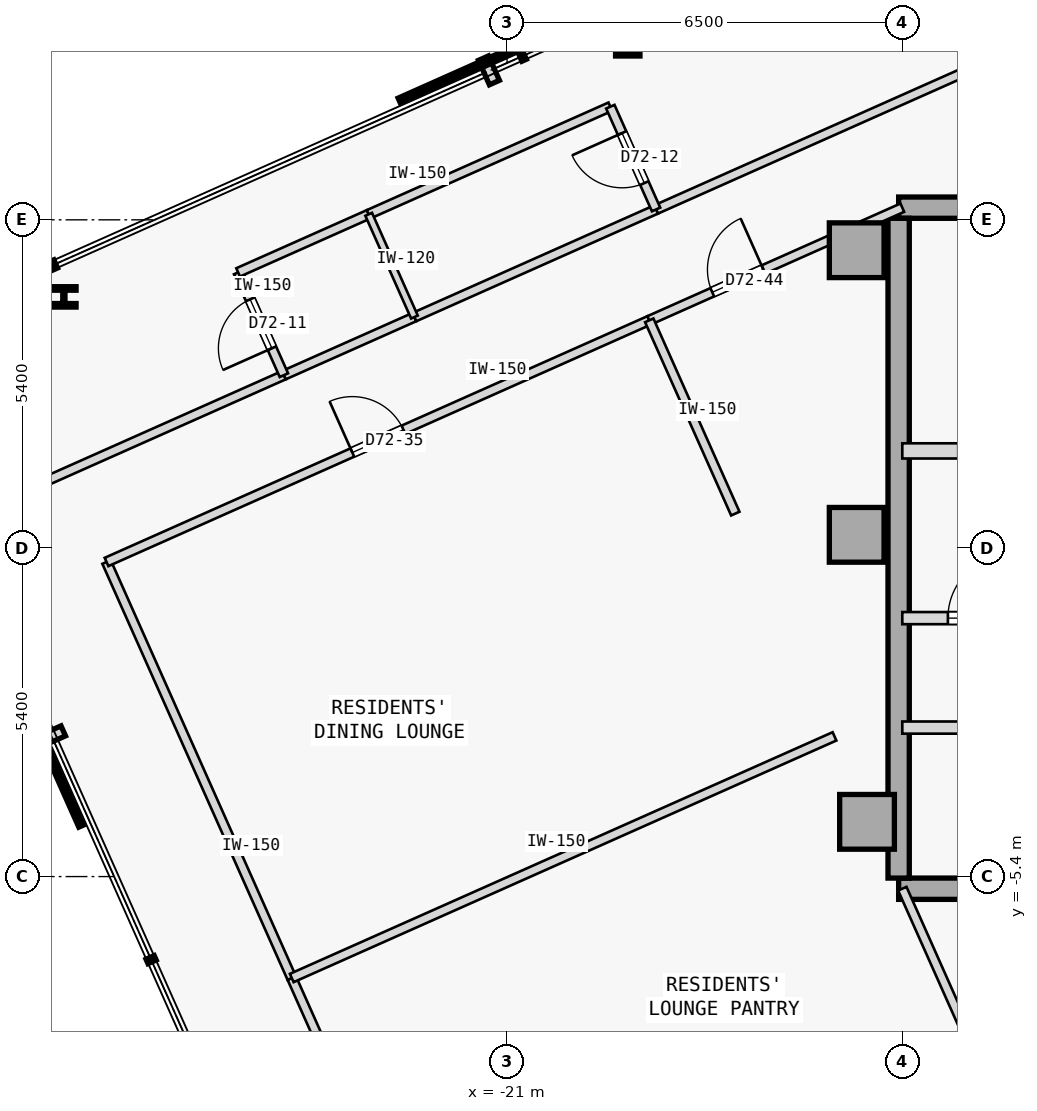
"""IFC4 building model, lengths in metres.
Left out: names, types, materials, properties, quantities, classifications, styles, units other than length and angle.
Written with IfcOpenShell. Run it as: python <this file> out.ifc"""

import sys

from ifc_helpers import new_model, si_unit, direction, frame, frame_2d, origin, origin_2d, place, context, subcontext, project, spatial, rectangle, i_section, extrude, element, fill, save


model = new_model("IFC4")
c1 = context("Model", 3, precision=1e-05, world=origin(), true_north=direction((0.0, 1.0)))
c2 = subcontext(c1, "Body", "Model", "MODEL_VIEW")
j1 = project(units=[si_unit("LENGTHUNIT", "METRE"), si_unit("PLANEANGLEUNIT", "RADIAN")], contexts=[c1])
p1 = place(None, origin())
s1 = spatial("IfcSite", under=j1, at=p1, CompositionType="ELEMENT")
p2 = place(p1, origin())
s2 = spatial("IfcBuilding", under=s1, at=p2, CompositionType="ELEMENT")
p3 = place(p2, frame((0.0, 0.0, 268.9)))
s3 = spatial("IfcBuildingStorey", under=s2, at=p3, CompositionType="ELEMENT", Elevation=268.9)
for number, where, z_axis, x_axis in (
    (1, (-15.25, 4.9, 0.0), (0.0, 0.0, 1.0), (1.0, 0.0, 0.0)),
    (2, (-15.25, 0.22, 0.0), (0.0, 0.0, 1.0), (1.0, 0.0, 0.0)),
    (3, (-15.08, -4.5, 0.0), (0.0, 0.0, 1.0), (1.0, 0.0, 0.0)),
):
    element("IfcColumn", number, at=place(p3, frame(where, z_axis=z_axis, x_axis=x_axis)), inside=s3, PredefinedType="COLUMN", context=c2, shape_type="SweptSolid", body=[
        extrude(rectangle(XDim=0.9, YDim=0.9, at=origin_2d()), origin(), (0.0, 0.0, 1.0), 3.35),
    ])
p4 = place(p3, frame((-14.56, 5.6, 0.0), z_axis=(0.0, 0.0, 1.0), x_axis=(1.0, 0.0, 0.0)))
e4 = element("IfcWall", 4, at=p4, inside=s3, PredefinedType="SHEAR", context=c2, shape_type="SweptSolid", body=[
    extrude(rectangle(XDim=11.41, YDim=0.35, at=frame_2d((5.705, 0.0))), origin(), (0.0, 0.0, 1.0), 3.125),
])
p5 = place(p3, frame((-14.56, -5.6, 0.0), z_axis=(0.0, 0.0, 1.0), x_axis=(1.0, 0.0, 0.0)))
e5 = element("IfcWall", 5, at=p5, inside=s3, PredefinedType="SHEAR", context=c2, shape_type="SweptSolid", body=[
    extrude(rectangle(XDim=10.86, YDim=0.35, at=frame_2d((5.43, 0.0))), origin(), (0.0, 0.0, 1.0), 3.125),
])
p6 = place(p3, frame((-14.56, -5.425, 0.0), z_axis=(0.0, 0.0, 1.0), x_axis=(0.0, 1.0, 0.0)))
e6 = element("IfcWall", 6, at=p6, inside=s3, PredefinedType="SHEAR", context=c2, shape_type="SweptSolid", body=[
    extrude(rectangle(XDim=10.85, YDim=0.35, at=frame_2d((5.425, 0.0))), origin(), (0.0, 0.0, 1.0), 3.125),
])
for number, where, z_axis, x_axis in (
    (7, (-19.015, 8.262, 0.0), (0.0, 0.0, 1.0), (1.0, 0.0, 0.0)),
    (8, (-28.288, 4.133, 0.0), (0.0, 0.0, 1.0), (1.0, 0.0, 0.0)),
):
    element("IfcColumn", number, at=place(p3, frame(where, z_axis=z_axis, x_axis=x_axis)), inside=s3, PredefinedType="COLUMN", context=c2, shape_type="SweptSolid", body=[
        extrude(i_section(OverallWidth=0.401, OverallDepth=0.335, WebThickness=0.036, FlangeThickness=0.058, FilletRadius=0.015, at=origin_2d()), origin(), (0.0, 0.0, 1.0), 3.35),
    ])
p7 = place(p3, frame((-14.5, 1.6, 0.0), z_axis=(0.0, 0.0, 1.0), x_axis=(1.0, 0.0, 0.0)))
e9 = element("IfcWall", 9, at=p7, inside=s3, PredefinedType="STANDARD", context=c2, shape_type="SweptSolid", body=[
    extrude(rectangle(XDim=3.6, YDim=0.25, at=frame_2d((1.8, 0.0))), origin(), (0.0, 0.0, 1.0), 3.125),
])
p8 = place(p7, frame((0.92, 0.0, 0.0)))
e10 = element("IfcOpeningElement", 10, at=p8, cuts=e9, PredefinedType="OPENING", context=c2, shape_type="SweptSolid", body=[
    extrude(rectangle(XDim=1.05, YDim=2.15, at=frame_2d((0.525, 1.075))), frame((0.0, 0.135, 0.0), z_axis=(0.0, -1.0, 0.0), x_axis=(1.0, 0.0, 0.0)), (0.0, 0.0, 1.0), 0.27),
])
p9 = place(p3, frame((-14.5, -1.15, 0.0), z_axis=(0.0, 0.0, 1.0), x_axis=(1.0, 0.0, 0.0)))
e11 = element("IfcWall", 11, at=p9, inside=s3, PredefinedType="STANDARD", context=c2, shape_type="SweptSolid", body=[
    extrude(rectangle(XDim=2.95, YDim=0.2, at=frame_2d((1.475, 0.0))), origin(), (0.0, 0.0, 1.0), 3.125),
])
p10 = place(p9, frame((0.75, 0.0, 0.0)))
e12 = element("IfcOpeningElement", 12, at=p10, cuts=e11, PredefinedType="OPENING", context=c2, shape_type="SweptSolid", body=[
    extrude(rectangle(XDim=1.05, YDim=2.18, at=frame_2d((0.525, 1.09))), frame((0.0, 0.11, 0.0), z_axis=(0.0, -1.0, 0.0), x_axis=(1.0, 0.0, 0.0)), (0.0, 0.0, 1.0), 0.22),
])
p11 = place(p3, frame((-14.5, -2.95, 0.0), z_axis=(0.0, 0.0, 1.0), x_axis=(1.0, 0.0, 0.0)))
e13 = element("IfcWall", 13, at=p11, inside=s3, PredefinedType="STANDARD", context=c2, shape_type="SweptSolid", body=[
    extrude(rectangle(XDim=10.8, YDim=0.2, at=frame_2d((5.4, 0.0))), origin(), (0.0, 0.0, 1.0), 3.125),
])
p12 = place(p11, frame((9.17, 0.0, 0.0)))
e14 = element("IfcOpeningElement", 14, at=p12, cuts=e13, PredefinedType="OPENING", context=c2, shape_type="SweptSolid", body=[
    extrude(rectangle(XDim=1.1, YDim=2.15, at=frame_2d((0.55, 1.075))), frame((0.0, 0.11, 0.0), z_axis=(0.0, -1.0, 0.0), x_axis=(1.0, 0.0, 0.0)), (0.0, 0.0, 1.0), 0.22),
])
p13 = place(p11, frame((3.86, 0.0, 0.0)))
e15 = element("IfcOpeningElement", 15, at=p13, cuts=e13, PredefinedType="OPENING", context=c2, shape_type="SweptSolid", body=[
    extrude(rectangle(XDim=0.92, YDim=2.15, at=frame_2d((0.46, 1.075))), frame((0.0, 0.11, 0.0), z_axis=(0.0, -1.0, 0.0), x_axis=(1.0, 0.0, 0.0)), (0.0, 0.0, 1.0), 0.22),
])
p14 = place(p3, frame((-30.063, 0.444, 0.0), z_axis=(0.0, 0.0, 1.0), x_axis=(0.913545336501, 0.406736915165, 0.0)))
e16 = element("IfcWall", 16, at=p14, inside=s3, PredefinedType="PARTITIONING", context=c2, shape_type="SweptSolid", body=[
    extrude(rectangle(XDim=5.904, YDim=0.15, at=frame_2d((2.952, 0.0))), origin(), (0.0, 0.0, 1.0), 3.125),
])
p15 = place(p3, frame((-18.549, 5.57, 0.0), z_axis=(0.0, 0.0, 1.0), x_axis=(0.913545955058, 0.40673552586, 0.0)))
e17 = element("IfcWall", 17, at=p15, inside=s3, PredefinedType="PARTITIONING", context=c2, shape_type="SweptSolid", body=[
    extrude(rectangle(XDim=13.808, YDim=0.15, at=frame_2d((6.904, 0.0))), origin(), (0.0, 0.0, 1.0), 3.125),
])
p16 = place(p15, frame((6.429, 0.0, 0.0)))
e18 = element("IfcOpeningElement", 18, at=p16, cuts=e17, PredefinedType="OPENING", context=c2, shape_type="SweptSolid", body=[
    extrude(rectangle(XDim=0.95, YDim=2.15, at=frame_2d((0.475, 1.075))), frame((0.0, 0.085, 0.0), z_axis=(0.0, -1.0, 0.0), x_axis=(1.0, 0.0, 0.0)), (0.0, 0.0, 1.0), 0.17),
])
p17 = place(p3, frame((-24.67, 2.845, 0.0), z_axis=(0.0, 0.0, 1.0), x_axis=(0.913541436194, 0.406745675276, 0.0)))
e19 = element("IfcWall", 19, at=p17, inside=s3, PredefinedType="PARTITIONING", context=c2, shape_type="SweptSolid", body=[
    extrude(rectangle(XDim=2.35, YDim=0.15, at=frame_2d((1.175, 0.0))), origin(), (0.0, 0.0, 1.0), 3.125),
])
p18 = place(p3, frame((-22.523, 3.801, 0.0), z_axis=(0.0, 0.0, 1.0), x_axis=(0.913545193015, 0.406737237438, 0.0)))
e20 = element("IfcWall", 20, at=p18, inside=s3, PredefinedType="PARTITIONING", context=c2, shape_type="SweptSolid", body=[
    extrude(rectangle(XDim=4.35, YDim=0.15, at=frame_2d((2.175, 0.0))), origin(), (0.0, 0.0, 1.0), 3.125),
])
p19 = place(p3, frame((-21.942, -12.904, 0.0), z_axis=(0.0, 0.0, 1.0), x_axis=(-0.406712833395, 0.913556058023, 0.0)))
e21 = element("IfcWall", 21, at=p19, inside=s3, PredefinedType="PARTITIONING", context=c2, shape_type="SweptSolid", body=[
    extrude(rectangle(XDim=6.388, YDim=0.15, at=frame_2d((3.194, 0.0))), origin(), (0.0, 0.0, 1.0), 3.125),
])
p20 = place(p19, frame((2.734, 0.0, 0.0)))
e22 = element("IfcOpeningElement", 22, at=p20, cuts=e21, PredefinedType="OPENING", context=c2, shape_type="SweptSolid", body=[
    extrude(rectangle(XDim=0.92, YDim=2.15, at=frame_2d((0.46, 1.075))), frame((0.0, 0.085, 0.0), z_axis=(0.0, -1.0, 0.0), x_axis=(1.0, 0.0, 0.0)), (0.0, 0.0, 1.0), 0.17),
])
p21 = place(p3, frame((-24.54, -7.068, 0.0), z_axis=(0.0, 0.0, 1.0), x_axis=(-0.406758457302, 0.913535745011, 0.0)))
e23 = element("IfcWall", 23, at=p21, inside=s3, PredefinedType="PARTITIONING", context=c2, shape_type="SweptSolid", body=[
    extrude(rectangle(XDim=7.489, YDim=0.15, at=frame_2d((3.744, 0.0))), origin(), (0.0, 0.0, 1.0), 3.125),
])
p22 = place(p3, frame((-27.586, -0.227, 0.0), z_axis=(0.0, 0.0, 1.0), x_axis=(0.913542396088, 0.40674351937, 0.0)))
e24 = element("IfcWall", 24, at=p22, inside=s3, PredefinedType="PARTITIONING", context=c2, shape_type="SweptSolid", body=[
    extrude(rectangle(XDim=9.77, YDim=0.15, at=frame_2d((4.885, 0.0))), origin(), (0.0, 0.0, 1.0), 3.125),
])
p23 = place(p22, frame((4.425, 0.0, 0.0)))
e25 = element("IfcOpeningElement", 25, at=p23, cuts=e24, PredefinedType="OPENING", context=c2, shape_type="SweptSolid", body=[
    extrude(rectangle(XDim=0.92, YDim=2.15, at=frame_2d((0.46, 1.075))), frame((0.0, 0.085, 0.0), z_axis=(0.0, -1.0, 0.0), x_axis=(1.0, 0.0, 0.0)), (0.0, 0.0, 1.0), 0.17),
])
p24 = place(p3, frame((-18.661, 3.747, 0.0), z_axis=(0.0, 0.0, 1.0), x_axis=(0.913535055583, 0.40676000568, 0.0)))
e26 = element("IfcWall", 26, at=p24, inside=s3, PredefinedType="PARTITIONING", context=c2, shape_type="SweptSolid", body=[
    extrude(rectangle(XDim=4.555, YDim=0.15, at=frame_2d((2.277, 0.0))), origin(), (0.0, 0.0, 1.0), 3.125),
])
p25 = place(p24, frame((1.134, 0.0, 0.0)))
e27 = element("IfcOpeningElement", 27, at=p25, cuts=e26, PredefinedType="OPENING", context=c2, shape_type="SweptSolid", body=[
    extrude(rectangle(XDim=0.92, YDim=2.15, at=frame_2d((0.46, 1.075))), frame((0.0, 0.085, 0.0), z_axis=(0.0, -1.0, 0.0), x_axis=(1.0, 0.0, 0.0)), (0.0, 0.0, 1.0), 0.17),
])
p26 = place(p3, frame((-24.67, 2.845, 0.0), z_axis=(0.0, 0.0, 1.0), x_axis=(-0.406701600856, 0.913561058639, 0.0)))
e28 = element("IfcWall", 28, at=p26, inside=s3, PredefinedType="PARTITIONING", context=c2, shape_type="SweptSolid", body=[
    extrude(rectangle(XDim=1.85, YDim=0.15, at=frame_2d((0.925, 0.0))), origin(), (0.0, 0.0, 1.0), 3.125),
])
p27 = place(p26, frame((0.485, 0.0, 0.0)))
e29 = element("IfcOpeningElement", 29, at=p27, cuts=e28, PredefinedType="OPENING", context=c2, shape_type="SweptSolid", body=[
    extrude(rectangle(XDim=0.88, YDim=2.15, at=frame_2d((0.44, 1.075))), frame((0.0, 0.085, 0.0), z_axis=(0.0, -1.0, 0.0), x_axis=(1.0, 0.0, 0.0)), (0.0, 0.0, 1.0), 0.17),
])
p28 = place(p3, frame((-25.422, 4.535, 0.0), z_axis=(0.0, 0.0, 1.0), x_axis=(0.913541436194, 0.406745675276, 0.0)))
e30 = element("IfcWall", 30, at=p28, inside=s3, PredefinedType="PARTITIONING", context=c2, shape_type="SweptSolid", body=[
    extrude(rectangle(XDim=2.35, YDim=0.15, at=frame_2d((1.175, 0.0))), origin(), (0.0, 0.0, 1.0), 3.125),
])
p29 = place(p3, frame((-23.275, 5.491, 0.0), z_axis=(0.0, 0.0, 1.0), x_axis=(0.913545193015, 0.406737237438, 0.0)))
e31 = element("IfcWall", 31, at=p29, inside=s3, PredefinedType="PARTITIONING", context=c2, shape_type="SweptSolid", body=[
    extrude(rectangle(XDim=4.35, YDim=0.15, at=frame_2d((2.175, 0.0))), origin(), (0.0, 0.0, 1.0), 3.125),
])
p30 = place(p3, frame((-18.549, 5.57, 0.0), z_axis=(0.0, 0.0, 1.0), x_axis=(-0.406701600856, 0.913561058639, 0.0)))
e32 = element("IfcWall", 32, at=p30, inside=s3, PredefinedType="PARTITIONING", context=c2, shape_type="SweptSolid", body=[
    extrude(rectangle(XDim=1.85, YDim=0.15, at=frame_2d((0.925, 0.0))), origin(), (0.0, 0.0, 1.0), 3.125),
])
p31 = place(p30, frame((0.475, 0.0, 0.0)))
e33 = element("IfcOpeningElement", 33, at=p31, cuts=e32, PredefinedType="OPENING", context=c2, shape_type="SweptSolid", body=[
    extrude(rectangle(XDim=0.9, YDim=2.15, at=frame_2d((0.45, 1.075))), frame((0.0, 0.085, 0.0), z_axis=(0.0, -1.0, 0.0), x_axis=(1.0, 0.0, 0.0)), (0.0, 0.0, 1.0), 0.17),
])
p32 = place(p3, frame((-22.523, 3.801, 0.0), z_axis=(0.0, 0.0, 1.0), x_axis=(-0.406701600856, 0.913561058639, 0.0)))
e34 = element("IfcWall", 34, at=p32, inside=s3, PredefinedType="PARTITIONING", context=c2, shape_type="SweptSolid", body=[
    extrude(rectangle(XDim=1.85, YDim=0.12, at=frame_2d((0.925, 0.0))), origin(), (0.0, 0.0, 1.0), 3.125),
])
p33 = place(p3, frame((-24.54, -7.068, 0.0), z_axis=(0.0, 0.0, 1.0), x_axis=(0.913551681238, 0.406722664364, 0.0)))
e35 = element("IfcWall", 35, at=p33, inside=s3, PredefinedType="PARTITIONING", context=c2, shape_type="SweptSolid", body=[
    extrude(rectangle(XDim=9.77, YDim=0.15, at=frame_2d((4.885, 0.0))), origin(), (0.0, 0.0, 1.0), 3.125),
])
p34 = place(p3, frame((-13.017, -8.93, 0.0), z_axis=(0.0, 0.0, 1.0), x_axis=(-0.406722395322, 0.913551801018, 0.0)))
e36 = element("IfcWall", 36, at=p34, inside=s3, PredefinedType="PARTITIONING", context=c2, shape_type="SweptSolid", body=[
    extrude(rectangle(XDim=3.646, YDim=0.15, at=frame_2d((1.823, 0.0))), origin(), (0.0, 0.0, 1.0), 3.125),
])
p35 = place(p3, frame((-17.246, 0.569, 0.0), z_axis=(0.0, 0.0, 1.0), x_axis=(-0.40673740295, 0.913545119324, 0.0)))
e37 = element("IfcWall", 37, at=p35, inside=s3, PredefinedType="PARTITIONING", context=c2, shape_type="SweptSolid", body=[
    extrude(rectangle(XDim=3.479, YDim=0.15, at=frame_2d((1.74, 0.0))), origin(), (0.0, 0.0, 1.0), 3.125),
])
p36 = place(p10, origin())
e38 = element("IfcDoor", 38, at=p36, inside=s3, OperationType="SINGLE_SWING_RIGHT", PredefinedType="DOOR", context=c2, shape_type="SweptSolid", body=[
    extrude(rectangle(XDim=1.05, YDim=2.18, at=frame_2d((0.525, 1.09))), frame((0.0, 0.025, 0.0), z_axis=(0.0, -1.0, 0.0), x_axis=(1.0, 0.0, 0.0)), (0.0, 0.0, 1.0), 0.05),
])
fill(e12, e38)
p37 = place(p27, origin())
e39 = element("IfcDoor", 39, at=p37, inside=s3, OperationType="SINGLE_SWING_LEFT", PredefinedType="DOOR", context=c2, shape_type="SweptSolid", body=[
    extrude(rectangle(XDim=0.88, YDim=2.15, at=frame_2d((0.44, 1.075))), frame((0.0, 0.025, 0.0), z_axis=(0.0, -1.0, 0.0), x_axis=(1.0, 0.0, 0.0)), (0.0, 0.0, 1.0), 0.05),
])
fill(e29, e39)
p38 = place(p31, origin())
e40 = element("IfcDoor", 40, at=p38, inside=s3, OperationType="SINGLE_SWING_RIGHT", PredefinedType="DOOR", context=c2, shape_type="SweptSolid", body=[
    extrude(rectangle(XDim=0.9, YDim=2.15, at=frame_2d((0.45, 1.075))), frame((0.0, 0.025, 0.0), z_axis=(0.0, -1.0, 0.0), x_axis=(1.0, 0.0, 0.0)), (0.0, 0.0, 1.0), 0.05),
])
fill(e33, e40)
p39 = place(p23, origin())
e41 = element("IfcDoor", 41, at=p39, inside=s3, OperationType="SINGLE_SWING_LEFT", PredefinedType="DOOR", context=c2, shape_type="SweptSolid", body=[
    extrude(rectangle(XDim=0.92, YDim=2.15, at=frame_2d((0.46, 1.075))), frame((0.0, 0.025, 0.0), z_axis=(0.0, -1.0, 0.0), x_axis=(1.0, 0.0, 0.0)), (0.0, 0.0, 1.0), 0.05),
])
fill(e25, e41)
p40 = place(p25, origin())
e42 = element("IfcDoor", 42, at=p40, inside=s3, OperationType="SINGLE_SWING_RIGHT", PredefinedType="DOOR", context=c2, shape_type="SweptSolid", body=[
    extrude(rectangle(XDim=0.92, YDim=2.15, at=frame_2d((0.46, 1.075))), frame((0.0, 0.025, 0.0), z_axis=(0.0, -1.0, 0.0), x_axis=(1.0, 0.0, 0.0)), (0.0, 0.0, 1.0), 0.05),
])
fill(e27, e42)
save(model, sys.argv[1])
